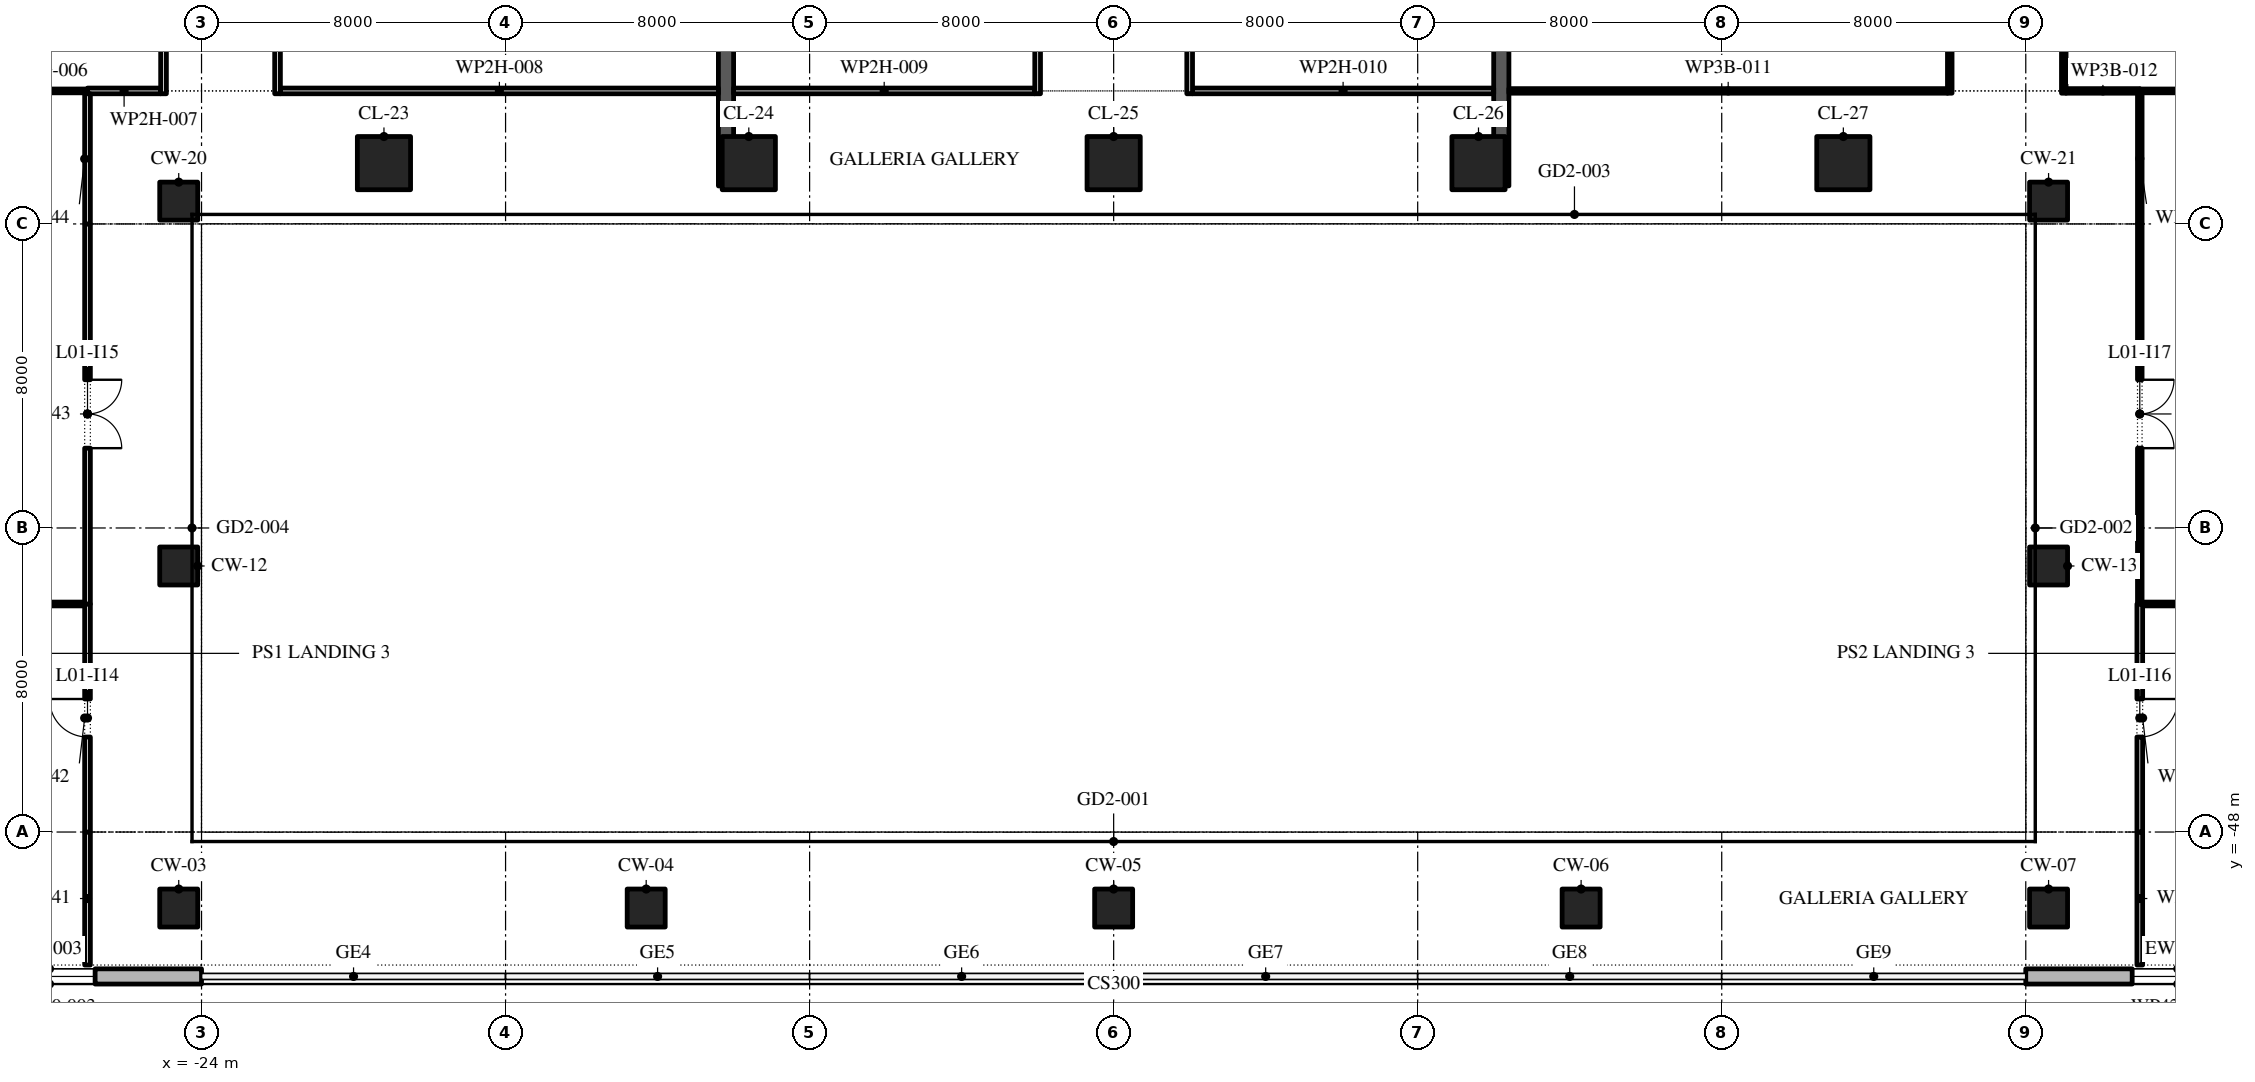
"""IFC4 building model, lengths in metres.
Left out: names, types, materials, properties, quantities, classifications, styles, units other than length and angle.
Written with IfcOpenShell. Run it as: python <this file> out.ifc"""

import sys

from ifc_helpers import new_model, si_unit, direction, frame, frame_2d, origin, origin_2d, place, context, subcontext, project, spatial, polyline, rectangle, outline, extrude, element, fill, save


model = new_model("IFC4")
c1 = context("Model", 3, precision=1e-05, world=origin(), true_north=direction((0.0, 1.0)))
c2 = subcontext(c1, "Body", "Model", "MODEL_VIEW")
j1 = project(units=[si_unit("LENGTHUNIT", "METRE"), si_unit("PLANEANGLEUNIT", "RADIAN")], contexts=[c1])
p1 = place(None, origin())
s1 = spatial("IfcSite", under=j1, at=p1, CompositionType="ELEMENT")
p2 = place(p1, origin())
s2 = spatial("IfcBuilding", under=s1, at=p2, CompositionType="ELEMENT")
p3 = place(p2, frame((0.0, 0.0, 8.0)))
s3 = spatial("IfcBuildingStorey", under=s2, at=p3, CompositionType="ELEMENT", Elevation=8.0)
for number, where, z_axis, x_axis in (
    (1, (-24.6, -50.0, 0.0), (0.0, 0.0, 1.0), (1.0, 0.0, 0.0)),
    (2, (-12.3, -50.0, 0.0), (0.0, 0.0, 1.0), (1.0, 0.0, 0.0)),
    (3, (0.0, -50.0, 0.0), (0.0, 0.0, 1.0), (1.0, 0.0, 0.0)),
    (4, (12.3, -50.0, 0.0), (0.0, 0.0, 1.0), (1.0, 0.0, 0.0)),
    (5, (24.6, -50.0, 0.0), (0.0, 0.0, 1.0), (1.0, 0.0, 0.0)),
    (6, (-24.6, -41.0, 0.0), (0.0, 0.0, 1.0), (1.0, 0.0, 0.0)),
    (7, (24.6, -41.0, 0.0), (0.0, 0.0, 1.0), (1.0, 0.0, 0.0)),
    (8, (-24.6, -31.4, 0.0), (0.0, 0.0, 1.0), (1.0, 0.0, 0.0)),
    (9, (24.6, -31.4, 0.0), (0.0, 0.0, 1.0), (1.0, 0.0, 0.0)),
):
    element("IfcColumn", number, at=place(p3, frame(where, z_axis=z_axis, x_axis=x_axis)), inside=s3, PredefinedType="COLUMN", context=c2, shape_type="SweptSolid", body=[
        extrude(rectangle(XDim=1.0, YDim=1.0, at=origin_2d()), origin(), (0.0, 0.0, 1.0), 6.0),
    ])
for number, where, z_axis, x_axis in (
    (10, (-19.2, -30.4, 0.0), (0.0, 0.0, 1.0), (1.0, 0.0, 0.0)),
    (11, (-9.6, -30.4, 0.0), (0.0, 0.0, 1.0), (1.0, 0.0, 0.0)),
    (12, (0.0, -30.4, 0.0), (0.0, 0.0, 1.0), (1.0, 0.0, 0.0)),
    (13, (9.6, -30.4, 0.0), (0.0, 0.0, 1.0), (1.0, 0.0, 0.0)),
    (14, (19.2, -30.4, 0.0), (0.0, 0.0, 1.0), (1.0, 0.0, 0.0)),
):
    element("IfcColumn", number, at=place(p3, frame(where, z_axis=z_axis, x_axis=x_axis)), inside=s3, PredefinedType="COLUMN", context=c2, shape_type="SweptSolid", body=[
        extrude(rectangle(XDim=1.4, YDim=1.4, at=origin_2d()), origin(), (0.0, 0.0, 1.0), 6.0),
    ])
for number, where, z_axis, x_axis in (
    (15, (-10.2, -31.0, 0.0), (0.0, 0.0, 1.0), (0.0, 1.0, 0.0)),
    (16, (10.2, -31.0, 0.0), (0.0, 0.0, 1.0), (0.0, 1.0, 0.0)),
):
    element("IfcWall", number, at=place(p3, frame(where, z_axis=z_axis, x_axis=x_axis)), inside=s3, PredefinedType="SHEAR", context=c2, shape_type="SweptSolid", body=[
        extrude(rectangle(XDim=15.0, YDim=0.4, at=frame_2d((7.5, 0.0))), origin(), (0.0, 0.0, 1.0), 5.7),
    ])
p4 = place(p3, frame((-32.0, -51.8, 0.0), z_axis=(0.0, 0.0, 1.0), x_axis=(1.0, 0.0, 0.0)))
e17 = element("IfcWall", 17, at=p4, inside=s3, PredefinedType="STANDARD", context=c2, shape_type="SweptSolid", body=[
    extrude(rectangle(XDim=8.0, YDim=0.4, at=frame_2d((4.0, 0.0))), origin(), (0.0, 0.0, 1.0), 5.7),
])
p5 = place(p4, frame((2.8, 0.0, 0.9)))
e18 = element("IfcOpeningElement", 18, at=p5, cuts=e17, PredefinedType="OPENING", context=c2, shape_type="SweptSolid", body=[
    extrude(outline(polyline([(0.0, 0.0), (2.4, 0.0), (2.4, 2.122), (2.379, 2.435), (2.318, 2.743), (2.217, 3.04), (2.078, 3.322), (1.904, 3.583), (1.697, 3.819), (1.461, 4.026), (1.2, 4.2), (0.939, 4.026), (0.703, 3.819), (0.496, 3.583), (0.322, 3.322), (0.183, 3.04), (0.082, 2.743), (0.021, 2.435), (0.0, 2.122), (0.0, 0.0)])), frame((0.0, 0.21, 0.0), z_axis=(0.0, -1.0, 0.0), x_axis=(1.0, 0.0, 0.0)), (0.0, 0.0, 1.0), 0.42),
])
p6 = place(p3, frame((24.0, -51.8, 0.0), z_axis=(0.0, 0.0, 1.0), x_axis=(1.0, 0.0, 0.0)))
e19 = element("IfcWall", 19, at=p6, inside=s3, PredefinedType="STANDARD", context=c2, shape_type="SweptSolid", body=[
    extrude(rectangle(XDim=8.0, YDim=0.4, at=frame_2d((4.0, 0.0))), origin(), (0.0, 0.0, 1.0), 5.7),
])
p7 = place(p6, frame((2.8, 0.0, 0.9)))
e20 = element("IfcOpeningElement", 20, at=p7, cuts=e19, PredefinedType="OPENING", context=c2, shape_type="SweptSolid", body=[
    extrude(outline(polyline([(0.0, 0.0), (2.4, 0.0), (2.4, 2.122), (2.379, 2.435), (2.318, 2.743), (2.217, 3.04), (2.078, 3.322), (1.904, 3.583), (1.697, 3.819), (1.461, 4.026), (1.2, 4.2), (0.939, 4.026), (0.703, 3.819), (0.496, 3.583), (0.322, 3.322), (0.183, 3.04), (0.082, 2.743), (0.021, 2.435), (0.0, 2.122), (0.0, 0.0)])), frame((0.0, 0.21, 0.0), z_axis=(0.0, -1.0, 0.0), x_axis=(1.0, 0.0, 0.0)), (0.0, 0.0, 1.0), 0.42),
])
for number, where, z_axis, x_axis in (
    (21, (-35.0, -42.0, 0.0), (0.0, 0.0, 1.0), (1.0, 0.0, 0.0)),
    (22, (27.075, -42.0, 0.0), (0.0, 0.0, 1.0), (1.0, 0.0, 0.0)),
):
    element("IfcWall", number, at=place(p3, frame(where, z_axis=z_axis, x_axis=x_axis)), inside=s3, PredefinedType="PARTITIONING", context=c2, shape_type="SweptSolid", body=[
        extrude(rectangle(XDim=7.925, YDim=0.1, at=frame_2d((3.962, 0.0))), origin(), (0.0, 0.0, 1.0), 5.7),
    ])
p8 = place(p3, frame((-29.9, -28.5, 0.0), z_axis=(0.0, 0.0, 1.0), x_axis=(1.0, 0.0, 0.0)))
e23 = element("IfcWall", 23, at=p8, inside=s3, PredefinedType="PARTITIONING", context=c2, shape_type="SweptSolid", body=[
    extrude(rectangle(XDim=2.9, YDim=0.1, at=frame_2d((1.45, 0.0))), origin(), (0.0, 0.0, 1.0), 5.7),
])
p9 = place(p3, frame((-27.0, -28.5, 0.0), z_axis=(0.0, 0.0, 1.0), x_axis=(1.0, 0.0, 0.0)))
e24 = element("IfcWall", 24, at=p9, inside=s3, PredefinedType="PARTITIONING", context=c2, shape_type="SweptSolid", body=[
    extrude(rectangle(XDim=1.925, YDim=0.15, at=frame_2d((0.962, 0.0))), origin(), (0.0, 0.0, 1.0), 5.7),
])
p10 = place(p3, frame((-21.925, -28.5, 0.0), z_axis=(0.0, 0.0, 1.0), x_axis=(1.0, 0.0, 0.0)))
e25 = element("IfcWall", 25, at=p10, inside=s3, PredefinedType="PARTITIONING", context=c2, shape_type="SweptSolid", body=[
    extrude(rectangle(XDim=11.525, YDim=0.15, at=frame_2d((5.763, 0.0))), origin(), (0.0, 0.0, 1.0), 5.7),
])
for number, where, z_axis, x_axis in (
    (26, (-10.0, -28.5, 0.0), (0.0, 0.0, 1.0), (1.0, 0.0, 0.0)),
    (27, (2.075, -28.5, 0.0), (0.0, 0.0, 1.0), (1.0, 0.0, 0.0)),
):
    element("IfcWall", number, at=place(p3, frame(where, z_axis=z_axis, x_axis=x_axis)), inside=s3, PredefinedType="PARTITIONING", context=c2, shape_type="SweptSolid", body=[
        extrude(rectangle(XDim=7.925, YDim=0.15, at=frame_2d((3.962, 0.0))), origin(), (0.0, 0.0, 1.0), 5.7),
    ])
p11 = place(p3, frame((10.4, -28.5, 0.0), z_axis=(0.0, 0.0, 1.0), x_axis=(1.0, 0.0, 0.0)))
e28 = element("IfcWall", 28, at=p11, inside=s3, PredefinedType="PARTITIONING", context=c2, shape_type="SweptSolid", body=[
    extrude(rectangle(XDim=11.54, YDim=0.12, at=frame_2d((5.77, 0.0))), origin(), (0.0, 0.0, 1.0), 5.7),
])
p12 = place(p3, frame((25.06, -28.5, 0.0), z_axis=(0.0, 0.0, 1.0), x_axis=(1.0, 0.0, 0.0)))
e29 = element("IfcWall", 29, at=p12, inside=s3, PredefinedType="PARTITIONING", context=c2, shape_type="SweptSolid", body=[
    extrude(rectangle(XDim=1.94, YDim=0.12, at=frame_2d((0.97, 0.0))), origin(), (0.0, 0.0, 1.0), 5.7),
])
p13 = place(p3, frame((27.0, -28.5, 0.0), z_axis=(0.0, 0.0, 1.0), x_axis=(1.0, 0.0, 0.0)))
e30 = element("IfcWall", 30, at=p13, inside=s3, PredefinedType="PARTITIONING", context=c2, shape_type="SweptSolid", body=[
    extrude(rectangle(XDim=2.9, YDim=0.1, at=frame_2d((1.45, 0.0))), origin(), (0.0, 0.0, 1.0), 5.7),
])
p14 = place(p3, frame((-27.0, -51.5, 0.0), z_axis=(0.0, 0.0, 1.0), x_axis=(0.0, 1.0, 0.0)))
e31 = element("IfcWall", 31, at=p14, inside=s3, PredefinedType="PARTITIONING", context=c2, shape_type="SweptSolid", body=[
    extrude(rectangle(XDim=3.5, YDim=0.15, at=frame_2d((1.75, 0.0))), origin(), (0.0, 0.0, 1.0), 5.7),
])
p15 = place(p3, frame((-27.0, -48.0, 0.0), z_axis=(0.0, 0.0, 1.0), x_axis=(0.0, 1.0, 0.0)))
e32 = element("IfcWall", 32, at=p15, inside=s3, PredefinedType="PARTITIONING", context=c2, shape_type="SweptSolid", body=[
    extrude(rectangle(XDim=6.0, YDim=0.15, at=frame_2d((3.0, 0.0))), origin(), (0.0, 0.0, 1.0), 5.7),
])
p16 = place(p15, frame((2.5, 0.0, 0.0)))
e33 = element("IfcOpeningElement", 33, at=p16, cuts=e32, PredefinedType="OPENING", context=c2, shape_type="SweptSolid", body=[
    extrude(rectangle(XDim=1.0, YDim=2.1, at=frame_2d((0.5, 1.05))), frame((0.0, 0.085, 0.0), z_axis=(0.0, -1.0, 0.0), x_axis=(1.0, 0.0, 0.0)), (0.0, 0.0, 1.0), 0.17),
])
p17 = place(p3, frame((-27.0, -42.0, 0.0), z_axis=(0.0, 0.0, 1.0), x_axis=(0.0, 1.0, 0.0)))
e34 = element("IfcWall", 34, at=p17, inside=s3, PredefinedType="PARTITIONING", context=c2, shape_type="SweptSolid", body=[
    extrude(rectangle(XDim=10.0, YDim=0.15, at=frame_2d((5.0, 0.0))), origin(), (0.0, 0.0, 1.0), 5.7),
])
p18 = place(p17, frame((4.1, 0.0, 0.0)))
e35 = element("IfcOpeningElement", 35, at=p18, cuts=e34, PredefinedType="OPENING", context=c2, shape_type="SweptSolid", body=[
    extrude(rectangle(XDim=1.8, YDim=2.1, at=frame_2d((0.9, 1.05))), frame((0.0, 0.085, 0.0), z_axis=(0.0, -1.0, 0.0), x_axis=(1.0, 0.0, 0.0)), (0.0, 0.0, 1.0), 0.17),
])
p19 = place(p3, frame((-27.0, -32.0, 0.0), z_axis=(0.0, 0.0, 1.0), x_axis=(0.0, 1.0, 0.0)))
e36 = element("IfcWall", 36, at=p19, inside=s3, PredefinedType="PARTITIONING", context=c2, shape_type="SweptSolid", body=[
    extrude(rectangle(XDim=3.425, YDim=0.15, at=frame_2d((1.712, 0.0))), origin(), (0.0, 0.0, 1.0), 5.7),
])
p20 = place(p3, frame((-25.0, -28.575, 0.0), z_axis=(0.0, 0.0, 1.0), x_axis=(0.0, 1.0, 0.0)))
e37 = element("IfcWall", 37, at=p20, inside=s3, PredefinedType="PARTITIONING", context=c2, shape_type="SweptSolid", body=[
    extrude(rectangle(XDim=9.575, YDim=0.15, at=frame_2d((4.788, 0.0))), origin(), (0.0, 0.0, 1.0), 5.7),
])
p21 = place(p20, frame((3.887, 0.0, 0.0)))
e38 = element("IfcOpeningElement", 38, at=p21, cuts=e37, PredefinedType="OPENING", context=c2, shape_type="SweptSolid", body=[
    extrude(rectangle(XDim=1.8, YDim=2.1, at=frame_2d((0.9, 1.05))), frame((0.0, 0.085, 0.0), z_axis=(0.0, -1.0, 0.0), x_axis=(1.0, 0.0, 0.0)), (0.0, 0.0, 1.0), 0.17),
])
p22 = place(p3, frame((-22.0, -28.575, 0.0), z_axis=(0.0, 0.0, 1.0), x_axis=(0.0, 1.0, 0.0)))
e39 = element("IfcWall", 39, at=p22, inside=s3, PredefinedType="PARTITIONING", context=c2, shape_type="SweptSolid", body=[
    extrude(rectangle(XDim=11.575, YDim=0.15, at=frame_2d((5.788, 0.0))), origin(), (0.0, 0.0, 1.0), 5.7),
])
p23 = place(p22, frame((5.288, 0.0, 0.0)))
e40 = element("IfcOpeningElement", 40, at=p23, cuts=e39, PredefinedType="OPENING", context=c2, shape_type="SweptSolid", body=[
    extrude(rectangle(XDim=1.0, YDim=2.1, at=frame_2d((0.5, 1.05))), frame((0.0, 0.085, 0.0), z_axis=(0.0, -1.0, 0.0), x_axis=(1.0, 0.0, 0.0)), (0.0, 0.0, 1.0), 0.17),
])
p24 = place(p3, frame((-2.0, -28.575, 0.0), z_axis=(0.0, 0.0, 1.0), x_axis=(0.0, 1.0, 0.0)))
e41 = element("IfcWall", 41, at=p24, inside=s3, PredefinedType="PARTITIONING", context=c2, shape_type="SweptSolid", body=[
    extrude(rectangle(XDim=12.575, YDim=0.15, at=frame_2d((6.288, 0.0))), origin(), (0.0, 0.0, 1.0), 5.7),
])
p25 = place(p24, frame((5.788, 0.0, 0.0)))
e42 = element("IfcOpeningElement", 42, at=p25, cuts=e41, PredefinedType="OPENING", context=c2, shape_type="SweptSolid", body=[
    extrude(rectangle(XDim=1.0, YDim=2.1, at=frame_2d((0.5, 1.05))), frame((0.0, 0.085, 0.0), z_axis=(0.0, -1.0, 0.0), x_axis=(1.0, 0.0, 0.0)), (0.0, 0.0, 1.0), 0.17),
])
p26 = place(p3, frame((2.0, -28.575, 0.0), z_axis=(0.0, 0.0, 1.0), x_axis=(0.0, 1.0, 0.0)))
e43 = element("IfcWall", 43, at=p26, inside=s3, PredefinedType="PARTITIONING", context=c2, shape_type="SweptSolid", body=[
    extrude(rectangle(XDim=16.575, YDim=0.15, at=frame_2d((8.288, 0.0))), origin(), (0.0, 0.0, 1.0), 5.7),
])
p27 = place(p26, frame((7.788, 0.0, 0.0)))
e44 = element("IfcOpeningElement", 44, at=p27, cuts=e43, PredefinedType="OPENING", context=c2, shape_type="SweptSolid", body=[
    extrude(rectangle(XDim=1.0, YDim=2.1, at=frame_2d((0.5, 1.05))), frame((0.0, 0.085, 0.0), z_axis=(0.0, -1.0, 0.0), x_axis=(1.0, 0.0, 0.0)), (0.0, 0.0, 1.0), 0.17),
])
p28 = place(p3, frame((22.0, -28.56, 0.0), z_axis=(0.0, 0.0, 1.0), x_axis=(0.0, 1.0, 0.0)))
e45 = element("IfcWall", 45, at=p28, inside=s3, PredefinedType="PARTITIONING", context=c2, shape_type="SweptSolid", body=[
    extrude(rectangle(XDim=11.56, YDim=0.12, at=frame_2d((5.78, 0.0))), origin(), (0.0, 0.0, 1.0), 5.7),
])
p29 = place(p28, frame((5.28, 0.0, 0.0)))
e46 = element("IfcOpeningElement", 46, at=p29, cuts=e45, PredefinedType="OPENING", context=c2, shape_type="SweptSolid", body=[
    extrude(rectangle(XDim=1.0, YDim=2.1, at=frame_2d((0.5, 1.05))), frame((0.0, 0.07, 0.0), z_axis=(0.0, -1.0, 0.0), x_axis=(1.0, 0.0, 0.0)), (0.0, 0.0, 1.0), 0.14),
])
p30 = place(p3, frame((25.0, -28.56, 0.0), z_axis=(0.0, 0.0, 1.0), x_axis=(0.0, 1.0, 0.0)))
e47 = element("IfcWall", 47, at=p30, inside=s3, PredefinedType="PARTITIONING", context=c2, shape_type="SweptSolid", body=[
    extrude(rectangle(XDim=10.56, YDim=0.12, at=frame_2d((5.28, 0.0))), origin(), (0.0, 0.0, 1.0), 5.7),
])
p31 = place(p30, frame((4.38, 0.0, 0.0)))
e48 = element("IfcOpeningElement", 48, at=p31, cuts=e47, PredefinedType="OPENING", context=c2, shape_type="SweptSolid", body=[
    extrude(rectangle(XDim=1.8, YDim=2.1, at=frame_2d((0.9, 1.05))), frame((0.0, 0.07, 0.0), z_axis=(0.0, -1.0, 0.0), x_axis=(1.0, 0.0, 0.0)), (0.0, 0.0, 1.0), 0.14),
])
p32 = place(p3, frame((27.0, -51.5, 0.0), z_axis=(0.0, 0.0, 1.0), x_axis=(0.0, 1.0, 0.0)))
e49 = element("IfcWall", 49, at=p32, inside=s3, PredefinedType="PARTITIONING", context=c2, shape_type="SweptSolid", body=[
    extrude(rectangle(XDim=3.5, YDim=0.15, at=frame_2d((1.75, 0.0))), origin(), (0.0, 0.0, 1.0), 5.7),
])
p33 = place(p3, frame((27.0, -48.0, 0.0), z_axis=(0.0, 0.0, 1.0), x_axis=(0.0, 1.0, 0.0)))
e50 = element("IfcWall", 50, at=p33, inside=s3, PredefinedType="PARTITIONING", context=c2, shape_type="SweptSolid", body=[
    extrude(rectangle(XDim=6.0, YDim=0.15, at=frame_2d((3.0, 0.0))), origin(), (0.0, 0.0, 1.0), 5.7),
])
p34 = place(p33, frame((2.5, 0.0, 0.0)))
e51 = element("IfcOpeningElement", 51, at=p34, cuts=e50, PredefinedType="OPENING", context=c2, shape_type="SweptSolid", body=[
    extrude(rectangle(XDim=1.0, YDim=2.1, at=frame_2d((0.5, 1.05))), frame((0.0, 0.085, 0.0), z_axis=(0.0, -1.0, 0.0), x_axis=(1.0, 0.0, 0.0)), (0.0, 0.0, 1.0), 0.17),
])
p35 = place(p3, frame((27.0, -42.0, 0.0), z_axis=(0.0, 0.0, 1.0), x_axis=(0.0, 1.0, 0.0)))
e52 = element("IfcWall", 52, at=p35, inside=s3, PredefinedType="PARTITIONING", context=c2, shape_type="SweptSolid", body=[
    extrude(rectangle(XDim=10.0, YDim=0.12, at=frame_2d((5.0, 0.0))), origin(), (0.0, 0.0, 1.0), 5.7),
])
p36 = place(p35, frame((4.1, 0.0, 0.0)))
e53 = element("IfcOpeningElement", 53, at=p36, cuts=e52, PredefinedType="OPENING", context=c2, shape_type="SweptSolid", body=[
    extrude(rectangle(XDim=1.8, YDim=2.1, at=frame_2d((0.9, 1.05))), frame((0.0, 0.07, 0.0), z_axis=(0.0, -1.0, 0.0), x_axis=(1.0, 0.0, 0.0)), (0.0, 0.0, 1.0), 0.14),
])
p37 = place(p3, frame((27.0, -32.0, 0.0), z_axis=(0.0, 0.0, 1.0), x_axis=(0.0, 1.0, 0.0)))
e54 = element("IfcWall", 54, at=p37, inside=s3, PredefinedType="PARTITIONING", context=c2, shape_type="SweptSolid", body=[
    extrude(rectangle(XDim=3.44, YDim=0.12, at=frame_2d((1.72, 0.0))), origin(), (0.0, 0.0, 1.0), 5.7),
])
p38 = place(p5, origin())
e55 = element("IfcWindow", 55, at=p38, inside=s3, PartitioningType="DOUBLE_PANEL_VERTICAL", PredefinedType="WINDOW", context=c2, shape_type="SweptSolid", body=[
    extrude(outline(polyline([(0.0, 0.0), (2.4, 0.0), (2.4, 2.122), (2.379, 2.435), (2.318, 2.743), (2.217, 3.04), (2.078, 3.322), (1.904, 3.583), (1.697, 3.819), (1.461, 4.026), (1.2, 4.2), (0.939, 4.026), (0.703, 3.819), (0.496, 3.583), (0.322, 3.322), (0.183, 3.04), (0.082, 2.743), (0.021, 2.435), (0.0, 2.122), (0.0, 0.0)])), frame((0.0, 0.03, 0.0), z_axis=(0.0, -1.0, 0.0), x_axis=(1.0, 0.0, 0.0)), (0.0, 0.0, 1.0), 0.06),
])
fill(e18, e55)
p39 = place(p7, origin())
e56 = element("IfcWindow", 56, at=p39, inside=s3, PartitioningType="DOUBLE_PANEL_VERTICAL", PredefinedType="WINDOW", context=c2, shape_type="SweptSolid", body=[
    extrude(outline(polyline([(0.0, 0.0), (2.4, 0.0), (2.4, 2.122), (2.379, 2.435), (2.318, 2.743), (2.217, 3.04), (2.078, 3.322), (1.904, 3.583), (1.697, 3.819), (1.461, 4.026), (1.2, 4.2), (0.939, 4.026), (0.703, 3.819), (0.496, 3.583), (0.322, 3.322), (0.183, 3.04), (0.082, 2.743), (0.021, 2.435), (0.0, 2.122), (0.0, 0.0)])), frame((0.0, 0.03, 0.0), z_axis=(0.0, -1.0, 0.0), x_axis=(1.0, 0.0, 0.0)), (0.0, 0.0, 1.0), 0.06),
])
fill(e20, e56)
p40 = place(p16, origin())
e57 = element("IfcDoor", 57, at=p40, inside=s3, OperationType="SINGLE_SWING_LEFT", PredefinedType="DOOR", context=c2, shape_type="SweptSolid", body=[
    extrude(rectangle(XDim=1.0, YDim=2.1, at=frame_2d((0.5, 1.05))), frame((0.0, 0.025, 0.0), z_axis=(0.0, -1.0, 0.0), x_axis=(1.0, 0.0, 0.0)), (0.0, 0.0, 1.0), 0.05),
])
fill(e33, e57)
p41 = place(p18, frame((1.8, 0.0, 0.0), z_axis=(0.0, 0.0, 1.0), x_axis=(-1.0, 0.0, 0.0)))
e58 = element("IfcDoor", 58, at=p41, inside=s3, OperationType="SINGLE_SWING_RIGHT", PredefinedType="DOOR", context=c2, shape_type="SweptSolid", body=[
    extrude(rectangle(XDim=1.8, YDim=2.1, at=frame_2d((0.9, 1.05))), frame((0.0, 0.025, 0.0), z_axis=(0.0, -1.0, 0.0), x_axis=(1.0, 0.0, 0.0)), (0.0, 0.0, 1.0), 0.05),
])
fill(e35, e58)
p42 = place(p34, frame((1.0, 0.0, 0.0), z_axis=(0.0, 0.0, 1.0), x_axis=(-1.0, 0.0, 0.0)))
e59 = element("IfcDoor", 59, at=p42, inside=s3, OperationType="SINGLE_SWING_RIGHT", PredefinedType="DOOR", context=c2, shape_type="SweptSolid", body=[
    extrude(rectangle(XDim=1.0, YDim=2.1, at=frame_2d((0.5, 1.05))), frame((0.0, 0.025, 0.0), z_axis=(0.0, -1.0, 0.0), x_axis=(1.0, 0.0, 0.0)), (0.0, 0.0, 1.0), 0.05),
])
fill(e51, e59)
p43 = place(p36, frame((1.8, 0.0, 0.0), z_axis=(0.0, 0.0, 1.0), x_axis=(-1.0, 0.0, 0.0)))
e60 = element("IfcDoor", 60, at=p43, inside=s3, OperationType="SINGLE_SWING_RIGHT", PredefinedType="DOOR", context=c2, shape_type="SweptSolid", body=[
    extrude(rectangle(XDim=1.8, YDim=2.1, at=frame_2d((0.9, 1.05))), frame((0.0, 0.025, 0.0), z_axis=(0.0, -1.0, 0.0), x_axis=(1.0, 0.0, 0.0)), (0.0, 0.0, 1.0), 0.05),
])
fill(e53, e60)
save(model, sys.argv[1])
